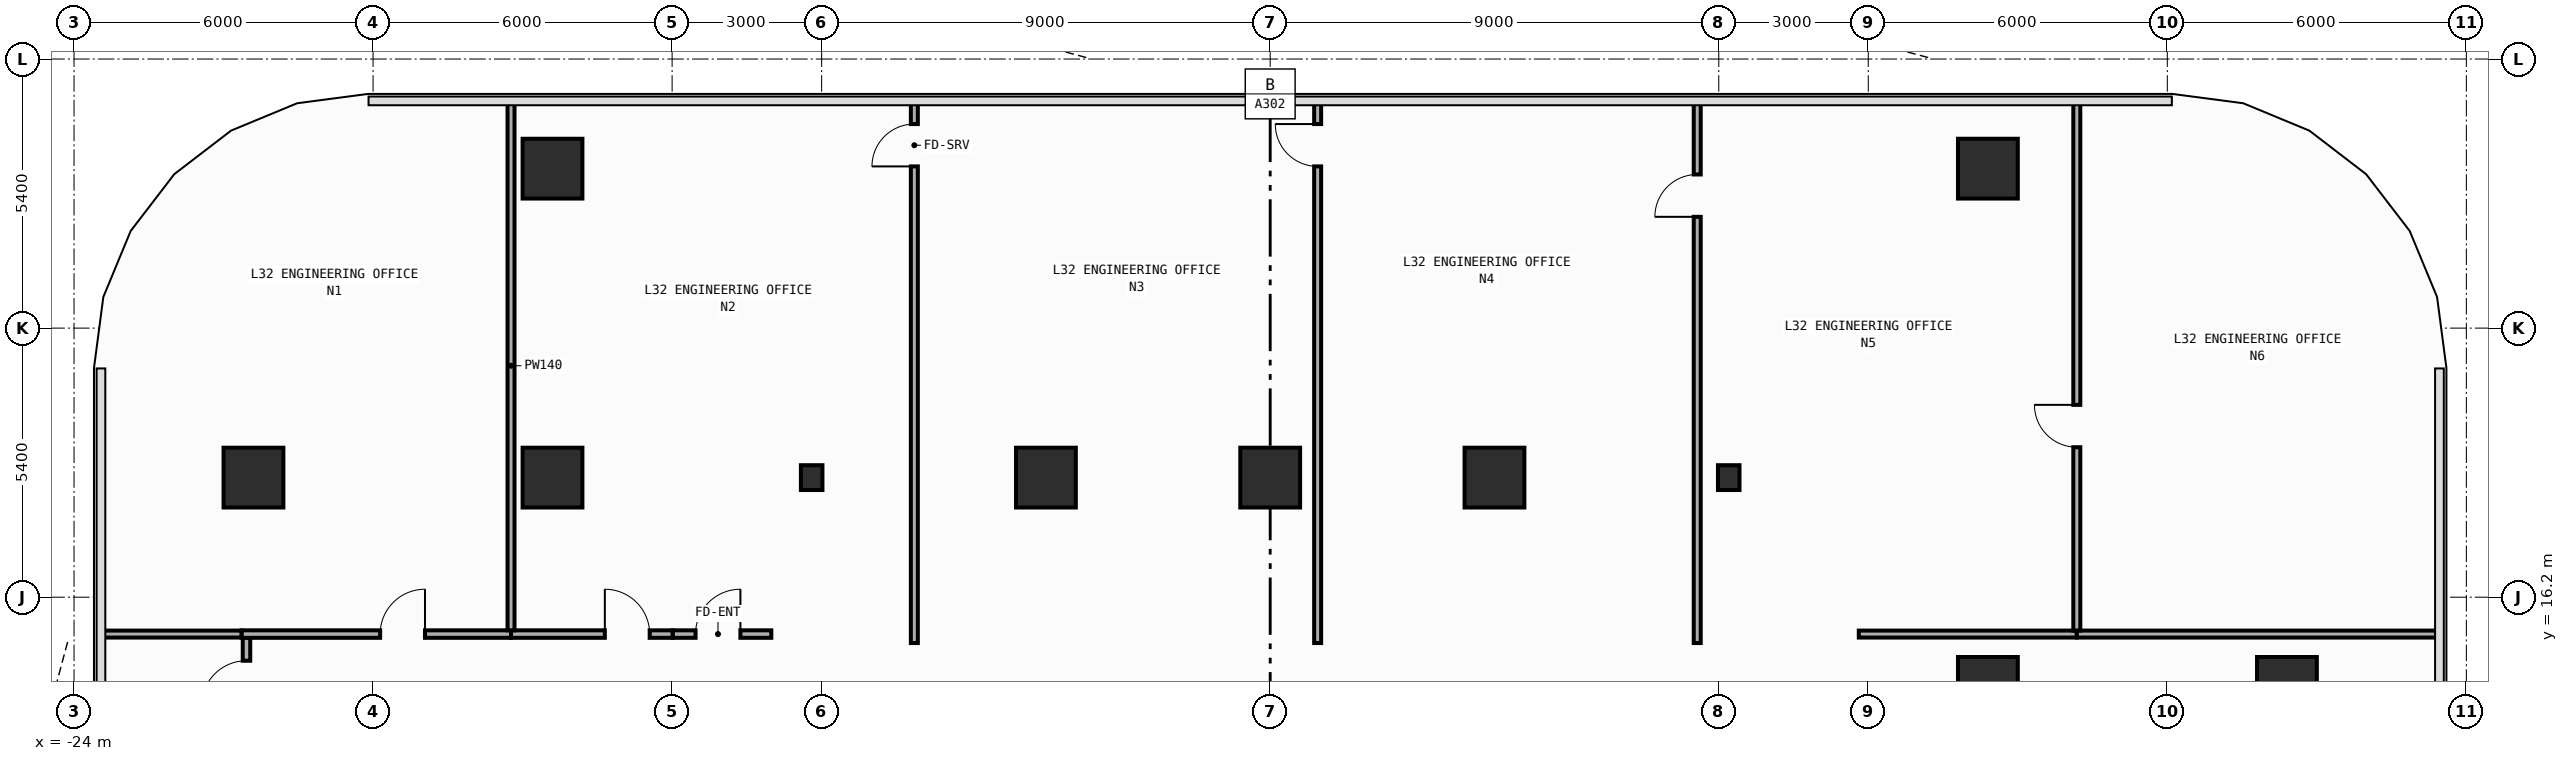
"""IFC4 building model, lengths in metres.
Left out: names, types, materials, properties, quantities, classifications, styles, units other than length and angle.
Written with IfcOpenShell. Run it as: python <this file> out.ifc"""

import sys

from ifc_helpers import new_model, si_unit, direction, frame, frame_2d, origin, origin_2d, place, context, subcontext, project, spatial, rectangle, i_section, extrude, element, fill, save


model = new_model("IFC4")
c1 = context("Model", 3, precision=1e-05, world=origin(), true_north=direction((0.0, 1.0)))
c2 = subcontext(c1, "Body", "Model", "MODEL_VIEW")
j1 = project(units=[si_unit("LENGTHUNIT", "METRE"), si_unit("PLANEANGLEUNIT", "RADIAN")], contexts=[c1])
p1 = place(None, origin())
s1 = spatial("IfcSite", under=j1, at=p1, CompositionType="ELEMENT")
p2 = place(p1, origin())
s2 = spatial("IfcBuilding", under=s1, at=p2, CompositionType="ELEMENT")
p3 = place(p2, frame((0.0, 0.0, 139.4)))
s3 = spatial("IfcBuildingStorey", under=s2, at=p3, CompositionType="ELEMENT", Elevation=139.4)
for number, where, z_axis, x_axis in (
    (1, (-9.2, 18.6, 0.0), (0.0, 0.0, 1.0), (1.0, 0.0, 0.0)),
    (2, (9.2, 18.6, 0.0), (0.0, 0.0, 1.0), (1.0, 0.0, 0.0)),
):
    element("IfcColumn", number, at=place(p3, frame(where, z_axis=z_axis, x_axis=x_axis)), inside=s3, PredefinedType="COLUMN", context=c2, shape_type="SweptSolid", body=[
        extrude(i_section(OverallWidth=0.432, OverallDepth=0.498, WebThickness=0.045, FlangeThickness=0.07, FilletRadius=0.022, at=origin_2d()), origin(), (0.0, 0.0, 1.0), 4.2),
    ])
for number, where, z_axis, x_axis in (
    (3, (-20.4, 18.6, 0.0), (0.0, 0.0, 1.0), (1.0, 0.0, 0.0)),
    (4, (20.4, 14.4, 0.0), (0.0, 0.0, 1.0), (1.0, 0.0, 0.0)),
    (5, (-14.4, 18.6, 0.0), (0.0, 0.0, 1.0), (1.0, 0.0, 0.0)),
    (6, (14.4, 14.4, 0.0), (0.0, 0.0, 1.0), (1.0, 0.0, 0.0)),
    (7, (-4.5, 18.6, 0.0), (0.0, 0.0, 1.0), (1.0, 0.0, 0.0)),
    (8, (0.0, 18.6, 0.0), (0.0, 0.0, 1.0), (1.0, 0.0, 0.0)),
    (9, (4.5, 18.6, 0.0), (0.0, 0.0, 1.0), (1.0, 0.0, 0.0)),
    (10, (-14.4, 24.8, 0.0), (0.0, 0.0, 1.0), (1.0, 0.0, 0.0)),
    (11, (14.4, 24.8, 0.0), (0.0, 0.0, 1.0), (1.0, 0.0, 0.0)),
):
    element("IfcColumn", number, at=place(p3, frame(where, z_axis=z_axis, x_axis=x_axis)), inside=s3, PredefinedType="COLUMN", context=c2, shape_type="SweptSolid", body=[
        extrude(rectangle(XDim=1.2, YDim=1.2, at=origin_2d()), origin(), (0.0, 0.0, 1.0), 4.2),
    ])
p4 = place(p3, frame((-11.99, 15.46, 0.0), z_axis=(0.0, 0.0, 1.0), x_axis=(1.0, 0.0, 0.0)))
e12 = element("IfcWall", 12, at=p4, inside=s3, PredefinedType="PARTITIONING", context=c2, shape_type="SweptSolid", body=[
    extrude(rectangle(XDim=1.98, YDim=0.15, at=frame_2d((0.99, 0.0))), origin(), (0.0, 0.0, 1.0), 3.94),
])
p5 = place(p4, frame((0.46, 0.0, 0.0)))
e13 = element("IfcOpeningElement", 13, at=p5, cuts=e12, PredefinedType="OPENING", context=c2, shape_type="SweptSolid", body=[
    extrude(rectangle(XDim=0.9, YDim=2.15, at=frame_2d((0.45, 1.075))), frame((0.0, 0.085, 0.0), z_axis=(0.0, -1.0, 0.0), x_axis=(1.0, 0.0, 0.0)), (0.0, 0.0, 1.0), 0.17),
])
p6 = place(p3, frame((-20.54, 13.36, 0.0), z_axis=(0.0, 0.0, 1.0), x_axis=(0.0, 1.0, 0.0)))
e14 = element("IfcWall", 14, at=p6, inside=s3, PredefinedType="PARTITIONING", context=c2, shape_type="SweptSolid", body=[
    extrude(rectangle(XDim=2.025, YDim=0.15, at=frame_2d((1.012, 0.0))), origin(), (0.0, 0.0, 1.0), 3.94),
])
p7 = place(p6, frame((0.665, 0.0, 0.0)))
e15 = element("IfcOpeningElement", 15, at=p7, cuts=e14, PredefinedType="OPENING", context=c2, shape_type="SweptSolid", body=[
    extrude(rectangle(XDim=0.9, YDim=2.15, at=frame_2d((0.45, 1.075))), frame((0.0, 0.085, 0.0), z_axis=(0.0, -1.0, 0.0), x_axis=(1.0, 0.0, 0.0)), (0.0, 0.0, 1.0), 0.17),
])
p8 = place(p3, frame((-20.64, 15.46, 0.0), z_axis=(0.0, 0.0, 1.0), x_axis=(1.0, 0.0, 0.0)))
e16 = element("IfcWall", 16, at=p8, inside=s3, PredefinedType="PARTITIONING", context=c2, shape_type="SweptSolid", body=[
    extrude(rectangle(XDim=5.408, YDim=0.15, at=frame_2d((2.704, 0.0))), origin(), (0.0, 0.0, 1.0), 3.94),
])
p9 = place(p8, frame((2.781, 0.0, 0.0)))
e17 = element("IfcOpeningElement", 17, at=p9, cuts=e16, PredefinedType="OPENING", context=c2, shape_type="SweptSolid", body=[
    extrude(rectangle(XDim=0.9, YDim=2.15, at=frame_2d((0.45, 1.075))), frame((0.0, 0.085, 0.0), z_axis=(0.0, -1.0, 0.0), x_axis=(1.0, 0.0, 0.0)), (0.0, 0.0, 1.0), 0.17),
])
p10 = place(p3, frame((-15.232, 15.46, 0.0), z_axis=(0.0, 0.0, 1.0), x_axis=(1.0, 0.0, 0.0)))
e18 = element("IfcWall", 18, at=p10, inside=s3, PredefinedType="PARTITIONING", context=c2, shape_type="SweptSolid", body=[
    extrude(rectangle(XDim=3.242, YDim=0.15, at=frame_2d((1.621, 0.0))), origin(), (0.0, 0.0, 1.0), 3.94),
])
p11 = place(p10, frame((1.882, 0.0, 0.0)))
e19 = element("IfcOpeningElement", 19, at=p11, cuts=e18, PredefinedType="OPENING", context=c2, shape_type="SweptSolid", body=[
    extrude(rectangle(XDim=0.9, YDim=2.15, at=frame_2d((0.45, 1.075))), frame((0.0, 0.085, 0.0), z_axis=(0.0, -1.0, 0.0), x_axis=(1.0, 0.0, 0.0)), (0.0, 0.0, 1.0), 0.17),
])
p12 = place(p3, frame((-23.455, 15.46, 0.0), z_axis=(0.0, 0.0, 1.0), x_axis=(1.0, 0.0, 0.0)))
e20 = element("IfcWall", 20, at=p12, inside=s3, PredefinedType="PARTITIONING", context=c2, shape_type="SweptSolid", body=[
    extrude(rectangle(XDim=2.815, YDim=0.14, at=frame_2d((1.408, 0.0))), origin(), (0.0, 0.0, 1.0), 3.94),
])
p13 = place(p3, frame((11.81, 15.46, 0.0), z_axis=(0.0, 0.0, 1.0), x_axis=(1.0, 0.0, 0.0)))
e21 = element("IfcWall", 21, at=p13, inside=s3, PredefinedType="PARTITIONING", context=c2, shape_type="SweptSolid", body=[
    extrude(rectangle(XDim=4.374, YDim=0.14, at=frame_2d((2.187, 0.0))), origin(), (0.0, 0.0, 1.0), 3.94),
])
p14 = place(p3, frame((16.184, 15.46, 0.0), z_axis=(0.0, 0.0, 1.0), x_axis=(1.0, 0.0, 0.0)))
e22 = element("IfcWall", 22, at=p14, inside=s3, PredefinedType="PARTITIONING", context=c2, shape_type="SweptSolid", body=[
    extrude(rectangle(XDim=7.271, YDim=0.14, at=frame_2d((3.635, 0.0))), origin(), (0.0, 0.0, 1.0), 3.94),
])
p15 = place(p3, frame((-15.232, 15.535, 0.0), z_axis=(0.0, 0.0, 1.0), x_axis=(0.0, 1.0, 0.0)))
e23 = element("IfcWall", 23, at=p15, inside=s3, PredefinedType="PARTITIONING", context=c2, shape_type="SweptSolid", body=[
    extrude(rectangle(XDim=10.62, YDim=0.14, at=frame_2d((5.31, 0.0))), origin(), (0.0, 0.0, 1.0), 3.94),
])
p16 = place(p3, frame((-7.14, 15.28, 0.0), z_axis=(0.0, 0.0, 1.0), x_axis=(0.0, 1.0, 0.0)))
e24 = element("IfcWall", 24, at=p16, inside=s3, PredefinedType="PARTITIONING", context=c2, shape_type="SweptSolid", body=[
    extrude(rectangle(XDim=10.875, YDim=0.14, at=frame_2d((5.438, 0.0))), origin(), (0.0, 0.0, 1.0), 3.94),
])
p17 = place(p16, frame((9.565, 0.0, 0.0)))
e25 = element("IfcOpeningElement", 25, at=p17, cuts=e24, PredefinedType="OPENING", context=c2, shape_type="SweptSolid", body=[
    extrude(rectangle(XDim=0.85, YDim=2.1, at=frame_2d((0.425, 1.05))), frame((0.0, 0.08, 0.0), z_axis=(0.0, -1.0, 0.0), x_axis=(1.0, 0.0, 0.0)), (0.0, 0.0, 1.0), 0.16),
])
p18 = place(p3, frame((0.952, 15.28, 0.0), z_axis=(0.0, 0.0, 1.0), x_axis=(0.0, 1.0, 0.0)))
e26 = element("IfcWall", 26, at=p18, inside=s3, PredefinedType="PARTITIONING", context=c2, shape_type="SweptSolid", body=[
    extrude(rectangle(XDim=10.875, YDim=0.14, at=frame_2d((5.438, 0.0))), origin(), (0.0, 0.0, 1.0), 3.94),
])
p19 = place(p18, frame((9.565, 0.0, 0.0)))
e27 = element("IfcOpeningElement", 27, at=p19, cuts=e26, PredefinedType="OPENING", context=c2, shape_type="SweptSolid", body=[
    extrude(rectangle(XDim=0.85, YDim=2.1, at=frame_2d((0.425, 1.05))), frame((0.0, 0.08, 0.0), z_axis=(0.0, -1.0, 0.0), x_axis=(1.0, 0.0, 0.0)), (0.0, 0.0, 1.0), 0.16),
])
p20 = place(p3, frame((8.568, 15.28, 0.0), z_axis=(0.0, 0.0, 1.0), x_axis=(0.0, 1.0, 0.0)))
e28 = element("IfcWall", 28, at=p20, inside=s3, PredefinedType="PARTITIONING", context=c2, shape_type="SweptSolid", body=[
    extrude(rectangle(XDim=10.875, YDim=0.14, at=frame_2d((5.438, 0.0))), origin(), (0.0, 0.0, 1.0), 3.94),
])
p21 = place(p20, frame((8.553, 0.0, 0.0)))
e29 = element("IfcOpeningElement", 29, at=p21, cuts=e28, PredefinedType="OPENING", context=c2, shape_type="SweptSolid", body=[
    extrude(rectangle(XDim=0.85, YDim=2.1, at=frame_2d((0.425, 1.05))), frame((0.0, 0.08, 0.0), z_axis=(0.0, -1.0, 0.0), x_axis=(1.0, 0.0, 0.0)), (0.0, 0.0, 1.0), 0.16),
])
p22 = place(p3, frame((16.184, 15.53, 0.0), z_axis=(0.0, 0.0, 1.0), x_axis=(0.0, 1.0, 0.0)))
e30 = element("IfcWall", 30, at=p22, inside=s3, PredefinedType="PARTITIONING", context=c2, shape_type="SweptSolid", body=[
    extrude(rectangle(XDim=10.625, YDim=0.14, at=frame_2d((5.312, 0.0))), origin(), (0.0, 0.0, 1.0), 3.94),
])
p23 = place(p22, frame((3.68, 0.0, 0.0)))
e31 = element("IfcOpeningElement", 31, at=p23, cuts=e30, PredefinedType="OPENING", context=c2, shape_type="SweptSolid", body=[
    extrude(rectangle(XDim=0.85, YDim=2.1, at=frame_2d((0.425, 1.05))), frame((0.0, 0.08, 0.0), z_axis=(0.0, -1.0, 0.0), x_axis=(1.0, 0.0, 0.0)), (0.0, 0.0, 1.0), 0.16),
])
p24 = place(p5, origin())
e32 = element("IfcDoor", 32, at=p24, inside=s3, OperationType="SINGLE_SWING_RIGHT", PredefinedType="DOOR", context=c2, shape_type="SweptSolid", body=[
    extrude(rectangle(XDim=0.9, YDim=2.15, at=frame_2d((0.45, 1.075))), frame((0.0, 0.025, 0.0), z_axis=(0.0, -1.0, 0.0), x_axis=(1.0, 0.0, 0.0)), (0.0, 0.0, 1.0), 0.05),
])
fill(e13, e32)
p25 = place(p7, origin())
e33 = element("IfcDoor", 33, at=p25, inside=s3, OperationType="SINGLE_SWING_LEFT", PredefinedType="DOOR", context=c2, shape_type="SweptSolid", body=[
    extrude(rectangle(XDim=0.9, YDim=2.15, at=frame_2d((0.45, 1.075))), frame((0.0, 0.025, 0.0), z_axis=(0.0, -1.0, 0.0), x_axis=(1.0, 0.0, 0.0)), (0.0, 0.0, 1.0), 0.05),
])
fill(e15, e33)
p26 = place(p9, origin())
e34 = element("IfcDoor", 34, at=p26, inside=s3, OperationType="SINGLE_SWING_RIGHT", PredefinedType="DOOR", context=c2, shape_type="SweptSolid", body=[
    extrude(rectangle(XDim=0.9, YDim=2.15, at=frame_2d((0.45, 1.075))), frame((0.0, 0.025, 0.0), z_axis=(0.0, -1.0, 0.0), x_axis=(1.0, 0.0, 0.0)), (0.0, 0.0, 1.0), 0.05),
])
fill(e17, e34)
p27 = place(p11, origin())
e35 = element("IfcDoor", 35, at=p27, inside=s3, OperationType="SINGLE_SWING_LEFT", PredefinedType="DOOR", context=c2, shape_type="SweptSolid", body=[
    extrude(rectangle(XDim=0.9, YDim=2.15, at=frame_2d((0.45, 1.075))), frame((0.0, 0.025, 0.0), z_axis=(0.0, -1.0, 0.0), x_axis=(1.0, 0.0, 0.0)), (0.0, 0.0, 1.0), 0.05),
])
fill(e19, e35)
p28 = place(p17, origin())
e36 = element("IfcDoor", 36, at=p28, inside=s3, OperationType="SINGLE_SWING_LEFT", PredefinedType="DOOR", context=c2, shape_type="SweptSolid", body=[
    extrude(rectangle(XDim=0.85, YDim=2.1, at=frame_2d((0.425, 1.05))), frame((0.0, 0.025, 0.0), z_axis=(0.0, -1.0, 0.0), x_axis=(1.0, 0.0, 0.0)), (0.0, 0.0, 1.0), 0.05),
])
fill(e25, e36)
p29 = place(p19, origin())
e37 = element("IfcDoor", 37, at=p29, inside=s3, OperationType="SINGLE_SWING_RIGHT", PredefinedType="DOOR", context=c2, shape_type="SweptSolid", body=[
    extrude(rectangle(XDim=0.85, YDim=2.1, at=frame_2d((0.425, 1.05))), frame((0.0, 0.025, 0.0), z_axis=(0.0, -1.0, 0.0), x_axis=(1.0, 0.0, 0.0)), (0.0, 0.0, 1.0), 0.05),
])
fill(e27, e37)
p30 = place(p21, origin())
e38 = element("IfcDoor", 38, at=p30, inside=s3, OperationType="SINGLE_SWING_LEFT", PredefinedType="DOOR", context=c2, shape_type="SweptSolid", body=[
    extrude(rectangle(XDim=0.85, YDim=2.1, at=frame_2d((0.425, 1.05))), frame((0.0, 0.025, 0.0), z_axis=(0.0, -1.0, 0.0), x_axis=(1.0, 0.0, 0.0)), (0.0, 0.0, 1.0), 0.05),
])
fill(e29, e38)
p31 = place(p23, origin())
e39 = element("IfcDoor", 39, at=p31, inside=s3, OperationType="SINGLE_SWING_RIGHT", PredefinedType="DOOR", context=c2, shape_type="SweptSolid", body=[
    extrude(rectangle(XDim=0.85, YDim=2.1, at=frame_2d((0.425, 1.05))), frame((0.0, 0.025, 0.0), z_axis=(0.0, -1.0, 0.0), x_axis=(1.0, 0.0, 0.0)), (0.0, 0.0, 1.0), 0.05),
])
fill(e31, e39)
save(model, sys.argv[1])
